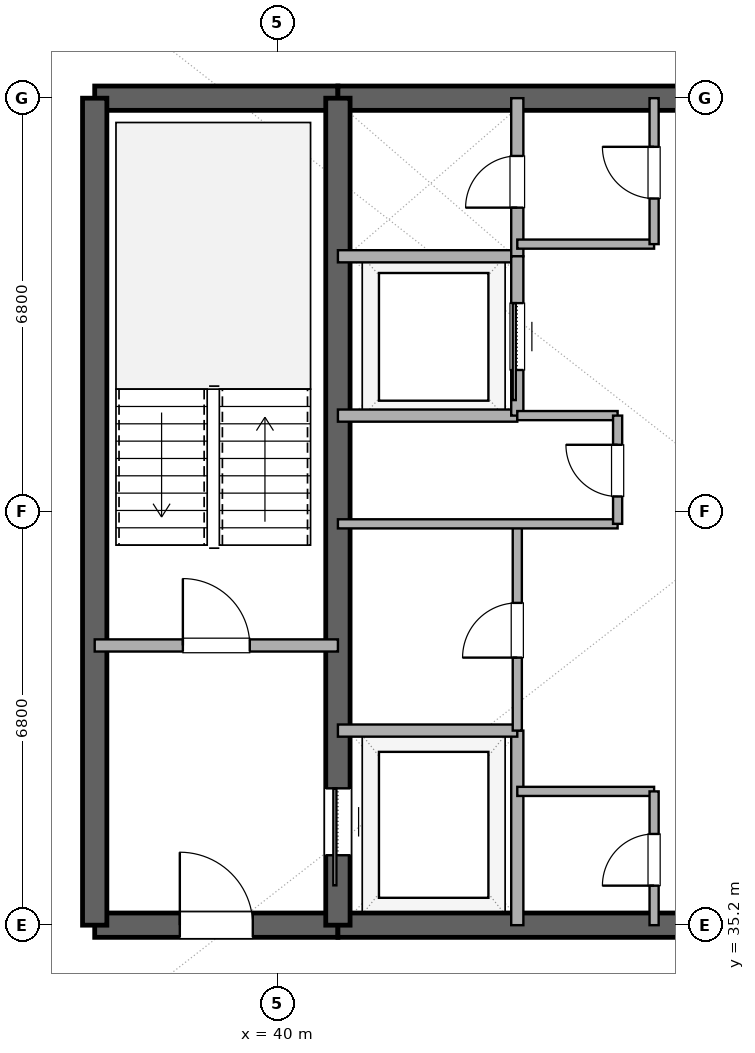
"""IFC4 building model, lengths in metres.
Left out: names, types, materials, properties, quantities, classifications, styles, units other than length and angle.
Written with IfcOpenShell. Run it as: python <this file> out.ifc"""

import sys

from ifc_helpers import new_model, si_unit, direction, frame, frame_2d, origin, place, context, subcontext, project, spatial, rectangle, extrude, element, fill, save


model = new_model("IFC4")
c1 = context("Model", 3, precision=1e-05, world=origin(), true_north=direction((0.0, 1.0)))
c2 = subcontext(c1, "Body", "Model", "MODEL_VIEW")
j1 = project(units=[si_unit("LENGTHUNIT", "METRE"), si_unit("PLANEANGLEUNIT", "RADIAN")], contexts=[c1])
p1 = place(None, origin())
s1 = spatial("IfcSite", under=j1, at=p1, CompositionType="ELEMENT")
p2 = place(p1, origin())
s2 = spatial("IfcBuilding", under=s1, at=p2, CompositionType="ELEMENT")
p3 = place(p2, frame((0.0, 0.0, 238.8)))
s3 = spatial("IfcBuildingStorey", under=s2, at=p3, CompositionType="ELEMENT", Elevation=238.8)
p4 = place(p3, frame((37.0, 35.2, 0.0), z_axis=(0.0, 0.0, 1.0), x_axis=(1.0, 0.0, 0.0)))
e1 = element("IfcWall", 1, at=p4, inside=s3, PredefinedType="SHEAR", context=c2, shape_type="SweptSolid", body=[
    extrude(rectangle(XDim=4.0, YDim=0.4, at=frame_2d((2.0, 0.0))), origin(), (0.0, 0.0, 1.0), 3.36),
])
p5 = place(p4, frame((1.4, 0.0, 0.0)))
e2 = element("IfcOpeningElement", 2, at=p5, cuts=e1, PredefinedType="OPENING", context=c2, shape_type="SweptSolid", body=[
    extrude(rectangle(XDim=1.2, YDim=2.15, at=frame_2d((0.6, 1.075))), frame((0.0, 0.21, 0.0), z_axis=(0.0, -1.0, 0.0), x_axis=(1.0, 0.0, 0.0)), (0.0, 0.0, 1.0), 0.42),
])
p6 = place(p3, frame((41.0, 35.2, 0.0), z_axis=(0.0, 0.0, 1.0), x_axis=(1.0, 0.0, 0.0)))
e3 = element("IfcWall", 3, at=p6, inside=s3, PredefinedType="SHEAR", context=c2, shape_type="SweptSolid", body=[
    extrude(rectangle(XDim=14.0, YDim=0.4, at=frame_2d((7.0, 0.0))), origin(), (0.0, 0.0, 1.0), 3.36),
])
p7 = place(p6, frame((6.1, 0.0, 0.0)))
e4 = element("IfcOpeningElement", 4, at=p7, cuts=e3, PredefinedType="OPENING", context=c2, shape_type="SweptSolid", body=[
    extrude(rectangle(XDim=1.8, YDim=2.25, at=frame_2d((0.9, 1.125))), frame((0.0, 0.21, 0.0), z_axis=(0.0, -1.0, 0.0), x_axis=(1.0, 0.0, 0.0)), (0.0, 0.0, 1.0), 0.42),
])
p8 = place(p3, frame((37.0, 48.8, 0.0), z_axis=(0.0, 0.0, 1.0), x_axis=(1.0, 0.0, 0.0)))
e5 = element("IfcWall", 5, at=p8, inside=s3, PredefinedType="SHEAR", context=c2, shape_type="SweptSolid", body=[
    extrude(rectangle(XDim=4.0, YDim=0.4, at=frame_2d((2.0, 0.0))), origin(), (0.0, 0.0, 1.0), 3.36),
])
p9 = place(p3, frame((41.0, 48.8, 0.0), z_axis=(0.0, 0.0, 1.0), x_axis=(1.0, 0.0, 0.0)))
e6 = element("IfcWall", 6, at=p9, inside=s3, PredefinedType="SHEAR", context=c2, shape_type="SweptSolid", body=[
    extrude(rectangle(XDim=14.0, YDim=0.4, at=frame_2d((7.0, 0.0))), origin(), (0.0, 0.0, 1.0), 3.36),
])
p10 = place(p9, frame((6.1, 0.0, 0.0)))
e7 = element("IfcOpeningElement", 7, at=p10, cuts=e6, PredefinedType="OPENING", context=c2, shape_type="SweptSolid", body=[
    extrude(rectangle(XDim=1.8, YDim=2.25, at=frame_2d((0.9, 1.125))), frame((0.0, 0.21, 0.0), z_axis=(0.0, -1.0, 0.0), x_axis=(1.0, 0.0, 0.0)), (0.0, 0.0, 1.0), 0.42),
])
p11 = place(p3, frame((37.0, 35.2, 0.0), z_axis=(0.0, 0.0, 1.0), x_axis=(0.0, 1.0, 0.0)))
e8 = element("IfcWall", 8, at=p11, inside=s3, PredefinedType="SHEAR", context=c2, shape_type="SweptSolid", body=[
    extrude(rectangle(XDim=13.6, YDim=0.4, at=frame_2d((6.8, 0.0))), origin(), (0.0, 0.0, 1.0), 3.36),
])
p12 = place(p3, frame((41.0, 35.2, 0.0), z_axis=(0.0, 0.0, 1.0), x_axis=(0.0, 1.0, 0.0)))
e9 = element("IfcWall", 9, at=p12, inside=s3, PredefinedType="SHEAR", context=c2, shape_type="SweptSolid", body=[
    extrude(rectangle(XDim=13.6, YDim=0.4, at=frame_2d((6.8, 0.0))), origin(), (0.0, 0.0, 1.0), 3.36),
])
p13 = place(p12, frame((1.15, 0.0, 0.0)))
e10 = element("IfcOpeningElement", 10, at=p13, cuts=e9, PredefinedType="OPENING", context=c2, shape_type="SweptSolid", body=[
    extrude(rectangle(XDim=1.1, YDim=2.2, at=frame_2d((0.55, 1.1))), frame((0.0, 0.21, 0.0), z_axis=(0.0, -1.0, 0.0), x_axis=(1.0, 0.0, 0.0)), (0.0, 0.0, 1.0), 0.42),
])
p14 = place(p3, frame((37.0, 39.8, 0.0), z_axis=(0.0, 0.0, 1.0), x_axis=(1.0, 0.0, 0.0)))
e11 = element("IfcWall", 11, at=p14, inside=s3, PredefinedType="SOLIDWALL", context=c2, shape_type="SweptSolid", body=[
    extrude(rectangle(XDim=4.0, YDim=0.2, at=frame_2d((2.0, 0.0))), origin(), (0.0, 0.0, 1.0), 2.72),
])
p15 = place(p14, frame((1.45, 0.0, 0.0)))
e12 = element("IfcOpeningElement", 12, at=p15, cuts=e11, PredefinedType="OPENING", context=c2, shape_type="SweptSolid", body=[
    extrude(rectangle(XDim=1.1, YDim=2.15, at=frame_2d((0.55, 1.075))), frame((0.0, 0.11, 0.0), z_axis=(0.0, -1.0, 0.0), x_axis=(1.0, 0.0, 0.0)), (0.0, 0.0, 1.0), 0.22),
])
p16 = place(p3, frame((43.95, 35.2, 0.0), z_axis=(0.0, 0.0, 1.0), x_axis=(0.0, 1.0, 0.0)))
e13 = element("IfcWall", 13, at=p16, inside=s3, PredefinedType="SOLIDWALL", context=c2, shape_type="SweptSolid", body=[
    extrude(rectangle(XDim=3.2, YDim=0.2, at=frame_2d((1.6, 0.0))), origin(), (0.0, 0.0, 1.0), 2.72),
])
for number, where, z_axis, x_axis in (
    (14, (41.0, 38.4, 0.0), (0.0, 0.0, 1.0), (1.0, 0.0, 0.0)),
    (15, (41.0, 46.2, 0.0), (0.0, 0.0, 1.0), (1.0, 0.0, 0.0)),
):
    element("IfcWall", number, at=place(p3, frame(where, z_axis=z_axis, x_axis=x_axis)), inside=s3, PredefinedType="SOLIDWALL", context=c2, shape_type="SweptSolid", body=[
        extrude(rectangle(XDim=2.95, YDim=0.2, at=frame_2d((1.475, 0.0))), origin(), (0.0, 0.0, 1.0), 2.72),
    ])
p17 = place(p3, frame((43.95, 46.2, 0.0), z_axis=(0.0, 0.0, 1.0), x_axis=(0.0, 1.0, 0.0)))
e16 = element("IfcWall", 16, at=p17, inside=s3, PredefinedType="SOLIDWALL", context=c2, shape_type="SweptSolid", body=[
    extrude(rectangle(XDim=2.6, YDim=0.2, at=frame_2d((1.3, 0.0))), origin(), (0.0, 0.0, 1.0), 2.72),
])
p18 = place(p17, frame((0.8, 0.0, 0.0)))
e17 = element("IfcOpeningElement", 17, at=p18, cuts=e16, PredefinedType="OPENING", context=c2, shape_type="SweptSolid", body=[
    extrude(rectangle(XDim=0.85, YDim=2.15, at=frame_2d((0.425, 1.075))), frame((0.0, 0.11, 0.0), z_axis=(0.0, -1.0, 0.0), x_axis=(1.0, 0.0, 0.0)), (0.0, 0.0, 1.0), 0.22),
])
p19 = place(p3, frame((41.0, 43.58, 0.0), z_axis=(0.0, 0.0, 1.0), x_axis=(1.0, 0.0, 0.0)))
e18 = element("IfcWall", 18, at=p19, inside=s3, PredefinedType="SOLIDWALL", context=c2, shape_type="SweptSolid", body=[
    extrude(rectangle(XDim=2.95, YDim=0.2, at=frame_2d((1.475, 0.0))), origin(), (0.0, 0.0, 1.0), 2.72),
])
p20 = place(p3, frame((43.95, 43.58, 0.0), z_axis=(0.0, 0.0, 1.0), x_axis=(0.0, 1.0, 0.0)))
e19 = element("IfcWall", 19, at=p20, inside=s3, PredefinedType="SOLIDWALL", context=c2, shape_type="SweptSolid", body=[
    extrude(rectangle(XDim=2.62, YDim=0.2, at=frame_2d((1.31, 0.0))), origin(), (0.0, 0.0, 1.0), 2.72),
])
p21 = place(p20, frame((0.75, 0.0, 0.0)))
e20 = element("IfcOpeningElement", 20, at=p21, cuts=e19, PredefinedType="OPENING", context=c2, shape_type="SweptSolid", body=[
    extrude(rectangle(XDim=1.1, YDim=2.2, at=frame_2d((0.55, 1.1))), frame((0.0, 0.11, 0.0), z_axis=(0.0, -1.0, 0.0), x_axis=(1.0, 0.0, 0.0)), (0.0, 0.0, 1.0), 0.22),
])
p22 = place(p3, frame((43.95, 38.4, 0.0), z_axis=(0.0, 0.0, 1.0), x_axis=(0.0, 1.0, 0.0)))
e21 = element("IfcWall", 21, at=p22, inside=s3, PredefinedType="PARTITIONING", context=c2, shape_type="SweptSolid", body=[
    extrude(rectangle(XDim=3.4, YDim=0.15, at=frame_2d((1.7, 0.0))), origin(), (0.0, 0.0, 1.0), 2.72),
])
p23 = place(p22, frame((1.2, 0.0, 0.0)))
e22 = element("IfcOpeningElement", 22, at=p23, cuts=e21, PredefinedType="OPENING", context=c2, shape_type="SweptSolid", body=[
    extrude(rectangle(XDim=0.9, YDim=2.15, at=frame_2d((0.45, 1.075))), frame((0.0, 0.085, 0.0), z_axis=(0.0, -1.0, 0.0), x_axis=(1.0, 0.0, 0.0)), (0.0, 0.0, 1.0), 0.17),
])
p24 = place(p3, frame((41.0, 41.8, 0.0), z_axis=(0.0, 0.0, 1.0), x_axis=(1.0, 0.0, 0.0)))
e23 = element("IfcWall", 23, at=p24, inside=s3, PredefinedType="PARTITIONING", context=c2, shape_type="SweptSolid", body=[
    extrude(rectangle(XDim=4.6, YDim=0.15, at=frame_2d((2.3, 0.0))), origin(), (0.0, 0.0, 1.0), 2.72),
])
p25 = place(p3, frame((43.95, 43.58, 0.0), z_axis=(0.0, 0.0, 1.0), x_axis=(1.0, 0.0, 0.0)))
e24 = element("IfcWall", 24, at=p25, inside=s3, PredefinedType="PARTITIONING", context=c2, shape_type="SweptSolid", body=[
    extrude(rectangle(XDim=1.65, YDim=0.15, at=frame_2d((0.825, 0.0))), origin(), (0.0, 0.0, 1.0), 2.72),
])
p26 = place(p3, frame((45.6, 41.8, 0.0), z_axis=(0.0, 0.0, 1.0), x_axis=(0.0, 1.0, 0.0)))
e25 = element("IfcWall", 25, at=p26, inside=s3, PredefinedType="PARTITIONING", context=c2, shape_type="SweptSolid", body=[
    extrude(rectangle(XDim=1.78, YDim=0.15, at=frame_2d((0.89, 0.0))), origin(), (0.0, 0.0, 1.0), 2.72),
])
p27 = place(p26, frame((0.45, 0.0, 0.0)))
e26 = element("IfcOpeningElement", 26, at=p27, cuts=e25, PredefinedType="OPENING", context=c2, shape_type="SweptSolid", body=[
    extrude(rectangle(XDim=0.85, YDim=2.15, at=frame_2d((0.425, 1.075))), frame((0.0, 0.085, 0.0), z_axis=(0.0, -1.0, 0.0), x_axis=(1.0, 0.0, 0.0)), (0.0, 0.0, 1.0), 0.17),
])
p28 = place(p3, frame((43.95, 37.4, 0.0), z_axis=(0.0, 0.0, 1.0), x_axis=(1.0, 0.0, 0.0)))
e27 = element("IfcWall", 27, at=p28, inside=s3, PredefinedType="PARTITIONING", context=c2, shape_type="SweptSolid", body=[
    extrude(rectangle(XDim=2.25, YDim=0.15, at=frame_2d((1.125, 0.0))), origin(), (0.0, 0.0, 1.0), 2.72),
])
p29 = place(p3, frame((46.2, 35.2, 0.0), z_axis=(0.0, 0.0, 1.0), x_axis=(0.0, 1.0, 0.0)))
e28 = element("IfcWall", 28, at=p29, inside=s3, PredefinedType="PARTITIONING", context=c2, shape_type="SweptSolid", body=[
    extrude(rectangle(XDim=2.2, YDim=0.15, at=frame_2d((1.1, 0.0))), origin(), (0.0, 0.0, 1.0), 2.72),
])
p30 = place(p29, frame((0.65, 0.0, 0.0)))
e29 = element("IfcOpeningElement", 29, at=p30, cuts=e28, PredefinedType="OPENING", context=c2, shape_type="SweptSolid", body=[
    extrude(rectangle(XDim=0.85, YDim=2.15, at=frame_2d((0.425, 1.075))), frame((0.0, 0.085, 0.0), z_axis=(0.0, -1.0, 0.0), x_axis=(1.0, 0.0, 0.0)), (0.0, 0.0, 1.0), 0.17),
])
p31 = place(p3, frame((43.95, 46.4, 0.0), z_axis=(0.0, 0.0, 1.0), x_axis=(1.0, 0.0, 0.0)))
e30 = element("IfcWall", 30, at=p31, inside=s3, PredefinedType="PARTITIONING", context=c2, shape_type="SweptSolid", body=[
    extrude(rectangle(XDim=2.25, YDim=0.15, at=frame_2d((1.125, 0.0))), origin(), (0.0, 0.0, 1.0), 2.72),
])
p32 = place(p3, frame((46.2, 46.4, 0.0), z_axis=(0.0, 0.0, 1.0), x_axis=(0.0, 1.0, 0.0)))
e31 = element("IfcWall", 31, at=p32, inside=s3, PredefinedType="PARTITIONING", context=c2, shape_type="SweptSolid", body=[
    extrude(rectangle(XDim=2.4, YDim=0.15, at=frame_2d((1.2, 0.0))), origin(), (0.0, 0.0, 1.0), 2.72),
])
p33 = place(p32, frame((0.75, 0.0, 0.0)))
e32 = element("IfcOpeningElement", 32, at=p33, cuts=e31, PredefinedType="OPENING", context=c2, shape_type="SweptSolid", body=[
    extrude(rectangle(XDim=0.85, YDim=2.15, at=frame_2d((0.425, 1.075))), frame((0.0, 0.085, 0.0), z_axis=(0.0, -1.0, 0.0), x_axis=(1.0, 0.0, 0.0)), (0.0, 0.0, 1.0), 0.17),
])
p34 = place(p13, origin())
e33 = element("IfcDoor", 33, at=p34, inside=s3, OperationType="SLIDING_TO_LEFT", PredefinedType="DOOR", context=c2, shape_type="SweptSolid", body=[
    extrude(rectangle(XDim=1.1, YDim=2.2, at=frame_2d((0.55, 1.1))), frame((0.0, 0.025, 0.0), z_axis=(0.0, -1.0, 0.0), x_axis=(1.0, 0.0, 0.0)), (0.0, 0.0, 1.0), 0.05),
])
fill(e10, e33)
p35 = place(p5, origin())
e34 = element("IfcDoor", 34, at=p35, inside=s3, OperationType="SINGLE_SWING_LEFT", PredefinedType="DOOR", context=c2, shape_type="SweptSolid", body=[
    extrude(rectangle(XDim=1.2, YDim=2.15, at=frame_2d((0.6, 1.075))), frame((0.0, 0.025, 0.0), z_axis=(0.0, -1.0, 0.0), x_axis=(1.0, 0.0, 0.0)), (0.0, 0.0, 1.0), 0.05),
])
fill(e2, e34)
p36 = place(p15, origin())
e35 = element("IfcDoor", 35, at=p36, inside=s3, OperationType="SINGLE_SWING_LEFT", PredefinedType="DOOR", context=c2, shape_type="SweptSolid", body=[
    extrude(rectangle(XDim=1.1, YDim=2.15, at=frame_2d((0.55, 1.075))), frame((0.0, 0.025, 0.0), z_axis=(0.0, -1.0, 0.0), x_axis=(1.0, 0.0, 0.0)), (0.0, 0.0, 1.0), 0.05),
])
fill(e12, e35)
p37 = place(p18, origin())
e36 = element("IfcDoor", 36, at=p37, inside=s3, OperationType="SINGLE_SWING_LEFT", PredefinedType="DOOR", context=c2, shape_type="SweptSolid", body=[
    extrude(rectangle(XDim=0.85, YDim=2.15, at=frame_2d((0.425, 1.075))), frame((0.0, 0.025, 0.0), z_axis=(0.0, -1.0, 0.0), x_axis=(1.0, 0.0, 0.0)), (0.0, 0.0, 1.0), 0.05),
])
fill(e17, e36)
p38 = place(p21, origin())
e37 = element("IfcDoor", 37, at=p38, inside=s3, OperationType="SLIDING_TO_LEFT", PredefinedType="DOOR", context=c2, shape_type="SweptSolid", body=[
    extrude(rectangle(XDim=1.1, YDim=2.2, at=frame_2d((0.55, 1.1))), frame((0.0, 0.025, 0.0), z_axis=(0.0, -1.0, 0.0), x_axis=(1.0, 0.0, 0.0)), (0.0, 0.0, 1.0), 0.05),
])
fill(e20, e37)
p39 = place(p23, origin())
e38 = element("IfcDoor", 38, at=p39, inside=s3, OperationType="SINGLE_SWING_LEFT", PredefinedType="DOOR", context=c2, shape_type="SweptSolid", body=[
    extrude(rectangle(XDim=0.9, YDim=2.15, at=frame_2d((0.45, 1.075))), frame((0.0, 0.025, 0.0), z_axis=(0.0, -1.0, 0.0), x_axis=(1.0, 0.0, 0.0)), (0.0, 0.0, 1.0), 0.05),
])
fill(e22, e38)
p40 = place(p27, origin())
e39 = element("IfcDoor", 39, at=p40, inside=s3, OperationType="SINGLE_SWING_RIGHT", PredefinedType="DOOR", context=c2, shape_type="SweptSolid", body=[
    extrude(rectangle(XDim=0.85, YDim=2.15, at=frame_2d((0.425, 1.075))), frame((0.0, 0.025, 0.0), z_axis=(0.0, -1.0, 0.0), x_axis=(1.0, 0.0, 0.0)), (0.0, 0.0, 1.0), 0.05),
])
fill(e26, e39)
p41 = place(p30, origin())
e40 = element("IfcDoor", 40, at=p41, inside=s3, OperationType="SINGLE_SWING_LEFT", PredefinedType="DOOR", context=c2, shape_type="SweptSolid", body=[
    extrude(rectangle(XDim=0.85, YDim=2.15, at=frame_2d((0.425, 1.075))), frame((0.0, 0.025, 0.0), z_axis=(0.0, -1.0, 0.0), x_axis=(1.0, 0.0, 0.0)), (0.0, 0.0, 1.0), 0.05),
])
fill(e29, e40)
p42 = place(p33, origin())
e41 = element("IfcDoor", 41, at=p42, inside=s3, OperationType="SINGLE_SWING_RIGHT", PredefinedType="DOOR", context=c2, shape_type="SweptSolid", body=[
    extrude(rectangle(XDim=0.85, YDim=2.15, at=frame_2d((0.425, 1.075))), frame((0.0, 0.025, 0.0), z_axis=(0.0, -1.0, 0.0), x_axis=(1.0, 0.0, 0.0)), (0.0, 0.0, 1.0), 0.05),
])
fill(e32, e41)
save(model, sys.argv[1])
